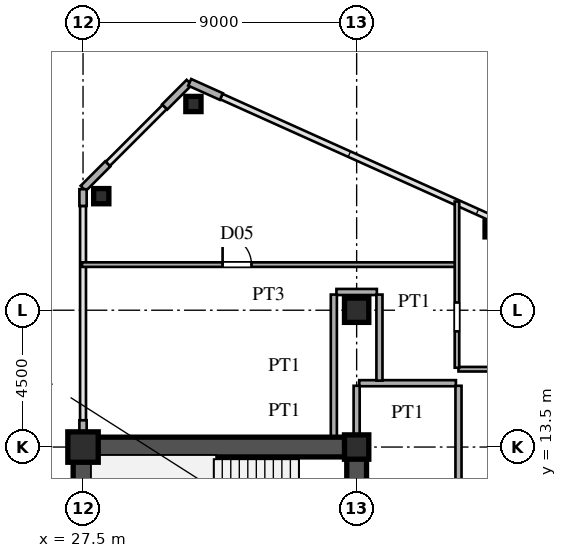
"""IFC4 building model, lengths in metres.
Left out: names, types, materials, properties, quantities, classifications, styles, units other than length and angle.
Written with IfcOpenShell. Run it as: python <this file> out.ifc"""

import sys

from ifc_helpers import new_model, si_unit, direction, frame, frame_2d, origin, origin_2d, place, context, subcontext, project, spatial, rectangle, hollow_rectangle, i_section, extrude, source, transform, mapped, element, fill, save


model = new_model("IFC4")
c1 = context("Model", 3, precision=1e-05, world=origin(), true_north=direction((0.0, 1.0)))
c2 = subcontext(c1, "Body", "Model", "MODEL_VIEW")
j1 = project(units=[si_unit("LENGTHUNIT", "METRE"), si_unit("PLANEANGLEUNIT", "RADIAN")], contexts=[c1])
p1 = place(None, origin())
s1 = spatial("IfcSite", under=j1, at=p1, CompositionType="ELEMENT")
p2 = place(p1, origin())
s2 = spatial("IfcBuilding", under=s1, at=p2, CompositionType="ELEMENT")
p3 = place(p2, frame((0.0, 0.0, 106.8)))
s3 = spatial("IfcBuildingStorey", under=s2, at=p3, CompositionType="ELEMENT", Elevation=106.8)
m1 = source(origin(), c2, "Body", "SweptSolid", [
    extrude(hollow_rectangle(XDim=1.0, YDim=1.0, WallThickness=0.042, at=origin_2d()), origin(), (0.0, 0.0, 1.0), 3.6),
])
p4 = place(p3, frame((27.5, 13.5, 0.0), z_axis=(0.0, 0.0, 1.0), x_axis=(1.0, 0.0, 0.0)))
e1 = element("IfcColumn", 1, at=p4, inside=s3, PredefinedType="COLUMN", context=c2, shape_type="MappedRepresentation", body=[
    mapped(m1, transform((0.0, 0.0, 0.0), scale=1.0)),
])
m2 = source(origin(), c2, "Body", "SweptSolid", [
    extrude(i_section(OverallWidth=0.8, OverallDepth=0.8, WebThickness=0.032, FlangeThickness=0.05, at=origin_2d()), origin(), (0.0, 0.0, 1.0), 3.6),
])
for number, where, z_axis, x_axis in (
    (2, (36.5, 13.5, 0.0), (0.0, 0.0, 1.0), (1.0, 0.0, 0.0)),
    (3, (36.5, 18.0, 0.0), (0.0, 0.0, 1.0), (1.0, 0.0, 0.0)),
):
    element("IfcColumn", number, at=place(p3, frame(where, z_axis=z_axis, x_axis=x_axis)), inside=s3, PredefinedType="COLUMN", context=c2, shape_type="MappedRepresentation", body=[
        mapped(m2, transform((0.0, 0.0, 0.0), scale=1.0)),
    ])
m3 = source(origin(), c2, "Body", "SweptSolid", [
    extrude(hollow_rectangle(XDim=0.5, YDim=0.5, WallThickness=0.02, at=origin_2d()), origin(), (0.0, 0.0, 1.0), 3.6),
])
for number, where, z_axis, x_axis in (
    (4, (31.131, 24.783, 0.0), (0.0, 0.0, 1.0), (1.0, 0.0, 0.0)),
    (5, (28.1, 21.751, 0.0), (0.0, 0.0, 1.0), (1.0, 0.0, 0.0)),
    (6, (40.973, 20.661, 0.0), (0.0, 0.0, 1.0), (1.0, 0.0, 0.0)),
):
    element("IfcColumn", number, at=place(p3, frame(where, z_axis=z_axis, x_axis=x_axis)), inside=s3, PredefinedType="COLUMN", context=c2, shape_type="MappedRepresentation", body=[
        mapped(m3, transform((0.0, 0.0, 0.0), scale=1.0)),
    ])
p5 = place(p3, frame((32.049, 25.028, 0.0), z_axis=(0.0, 0.0, 1.0), x_axis=(-0.911929519623, 0.410346866979, 0.0)))
e7 = element("IfcWall", 7, at=p5, inside=s3, PredefinedType="SOLIDWALL", context=c2, shape_type="SweptSolid", body=[
    extrude(rectangle(XDim=1.14, YDim=0.24, at=frame_2d((0.57, 0.0))), origin(), (0.0, 0.0, 1.0), 3.38),
])
for number, where, z_axis, x_axis in (
    (8, (30.993, 25.493, 0.0), (0.0, 0.0, 1.0), (-0.707, -0.707, 0.0)),
    (9, (28.313, 22.813, 0.0), (0.0, 0.0, 1.0), (-0.707, -0.707, 0.0)),
):
    element("IfcWall", number, at=place(p3, frame(where, z_axis=z_axis, x_axis=x_axis)), inside=s3, PredefinedType="SOLIDWALL", context=c2, shape_type="SweptSolid", body=[
        extrude(rectangle(XDim=1.14, YDim=0.24, at=frame_2d((0.57, 0.0))), origin(), (0.0, 0.0, 1.0), 3.38),
    ])
p6 = place(p3, frame((27.5, 13.83, 0.0), z_axis=(0.0, 0.0, 1.0), x_axis=(0.0, 1.0, 0.0)))
e10 = element("IfcWall", 10, at=p6, inside=s3, PredefinedType="SOLIDWALL", context=c2, shape_type="SweptSolid", body=[
    extrude(rectangle(XDim=0.55, YDim=0.24, at=frame_2d((0.275, 0.0))), origin(), (0.0, 0.0, 1.0), 1.88),
])
p7 = place(p3, frame((27.5, 21.43, 0.0), z_axis=(0.0, 0.0, 1.0), x_axis=(0.0, 1.0, 0.0)))
e11 = element("IfcWall", 11, at=p7, inside=s3, PredefinedType="SOLIDWALL", context=c2, shape_type="SweptSolid", body=[
    extrude(rectangle(XDim=0.55, YDim=0.24, at=frame_2d((0.275, 0.0))), origin(), (0.0, 0.0, 1.0), 3.38),
])
p8 = place(p3, frame((27.5, 1.3, 0.0), z_axis=(0.0, 0.0, 1.0), x_axis=(0.0, 1.0, 0.0)))
e12 = element("IfcWall", 12, at=p8, inside=s3, PredefinedType="SHEAR", context=c2, shape_type="SweptSolid", body=[
    extrude(rectangle(XDim=12.2, YDim=0.65, at=frame_2d((6.1, 0.0))), origin(), (0.0, 0.0, 1.0), 3.38),
])
p9 = place(p3, frame((27.5, 13.5, 0.0), z_axis=(0.0, 0.0, 1.0), x_axis=(1.0, 0.0, 0.0)))
e13 = element("IfcWall", 13, at=p9, inside=s3, PredefinedType="SHEAR", context=c2, shape_type="SweptSolid", body=[
    extrude(rectangle(XDim=9.0, YDim=0.65, at=frame_2d((4.5, 0.0))), origin(), (0.0, 0.0, 1.0), 3.38),
])
p10 = place(p3, frame((36.5, 8.2, 0.0), z_axis=(0.0, 0.0, 1.0), x_axis=(0.0, 1.0, 0.0)))
e14 = element("IfcWall", 14, at=p10, inside=s3, PredefinedType="SHEAR", context=c2, shape_type="SweptSolid", body=[
    extrude(rectangle(XDim=5.45, YDim=0.65, at=frame_2d((2.725, 0.0))), origin(), (0.0, 0.0, 1.0), 3.38),
])
p11 = place(p10, frame((0.245, 0.0, 0.0)))
e15 = element("IfcOpeningElement", 15, at=p11, cuts=e14, PredefinedType="OPENING", context=c2, shape_type="SweptSolid", body=[
    extrude(rectangle(XDim=0.95, YDim=2.15, at=frame_2d((0.475, 1.075))), frame((0.0, 0.335, 0.0), z_axis=(0.0, -1.0, 0.0), x_axis=(1.0, 0.0, 0.0)), (0.0, 0.0, 1.0), 0.67),
])
p12 = place(p3, frame((36.585, 15.6, 0.0), z_axis=(0.0, 0.0, 1.0), x_axis=(1.0, 0.0, 0.0)))
e16 = element("IfcWall", 16, at=p12, inside=s3, PredefinedType="PARTITIONING", context=c2, shape_type="SweptSolid", body=[
    extrude(rectangle(XDim=3.18, YDim=0.2, at=frame_2d((1.59, 0.0))), origin(), (0.0, 0.0, 1.0), 3.38),
])
p13 = place(p3, frame((39.85, 16.06, 0.0), z_axis=(0.0, 0.0, 1.0), x_axis=(1.0, 0.0, 0.0)))
e17 = element("IfcWall", 17, at=p13, inside=s3, PredefinedType="PARTITIONING", context=c2, shape_type="SweptSolid", body=[
    extrude(rectangle(XDim=5.6, YDim=0.15, at=frame_2d((2.8, 0.0))), origin(), (0.0, 0.0, 1.0), 3.38),
])
p14 = place(p13, frame((2.325, 0.0, 0.0)))
e18 = element("IfcOpeningElement", 18, at=p14, cuts=e17, PredefinedType="OPENING", context=c2, shape_type="SweptSolid", body=[
    extrude(rectangle(XDim=0.95, YDim=2.15, at=frame_2d((0.475, 1.075))), frame((0.0, 0.085, 0.0), z_axis=(0.0, -1.0, 0.0), x_axis=(1.0, 0.0, 0.0)), (0.0, 0.0, 1.0), 0.17),
])
p15 = place(p3, frame((35.835, 18.6, 0.0), z_axis=(0.0, 0.0, 1.0), x_axis=(1.0, 0.0, 0.0)))
e19 = element("IfcWall", 19, at=p15, inside=s3, PredefinedType="PARTITIONING", context=c2, shape_type="SweptSolid", body=[
    extrude(rectangle(XDim=1.33, YDim=0.2, at=frame_2d((0.665, 0.0))), origin(), (0.0, 0.0, 1.0), 3.38),
])
p16 = place(p3, frame((27.465, 19.5, 0.0), z_axis=(0.0, 0.0, 1.0), x_axis=(1.0, 0.0, 0.0)))
e20 = element("IfcWall", 20, at=p16, inside=s3, PredefinedType="PARTITIONING", context=c2, shape_type="SweptSolid", body=[
    extrude(rectangle(XDim=12.285, YDim=0.15, at=frame_2d((6.143, 0.0))), origin(), (0.0, 0.0, 1.0), 3.38),
])
p17 = place(p16, frame((4.625, 0.0, 0.0)))
e21 = element("IfcOpeningElement", 21, at=p17, cuts=e20, PredefinedType="OPENING", context=c2, shape_type="SweptSolid", body=[
    extrude(rectangle(XDim=0.95, YDim=2.15, at=frame_2d((0.475, 1.075))), frame((0.0, 0.085, 0.0), z_axis=(0.0, -1.0, 0.0), x_axis=(1.0, 0.0, 0.0)), (0.0, 0.0, 1.0), 0.17),
])
p18 = place(p3, frame((35.75, 13.83, 0.0), z_axis=(0.0, 0.0, 1.0), x_axis=(0.0, 1.0, 0.0)))
e22 = element("IfcWall", 22, at=p18, inside=s3, PredefinedType="PARTITIONING", context=c2, shape_type="SweptSolid", body=[
    extrude(rectangle(XDim=4.685, YDim=0.2, at=frame_2d((2.342, 0.0))), origin(), (0.0, 0.0, 1.0), 3.38),
])
p19 = place(p3, frame((36.5, 13.83, 0.0), z_axis=(0.0, 0.0, 1.0), x_axis=(0.0, 1.0, 0.0)))
e23 = element("IfcWall", 23, at=p19, inside=s3, PredefinedType="PARTITIONING", context=c2, shape_type="SweptSolid", body=[
    extrude(rectangle(XDim=1.685, YDim=0.2, at=frame_2d((0.842, 0.0))), origin(), (0.0, 0.0, 1.0), 1.38),
])
p20 = place(p3, frame((37.25, 15.685, 0.0), z_axis=(0.0, 0.0, 1.0), x_axis=(0.0, 1.0, 0.0)))
e24 = element("IfcWall", 24, at=p20, inside=s3, PredefinedType="PARTITIONING", context=c2, shape_type="SweptSolid", body=[
    extrude(rectangle(XDim=2.83, YDim=0.2, at=frame_2d((1.415, 0.0))), origin(), (0.0, 0.0, 1.0), 3.38),
])
p21 = place(p3, frame((39.8, 16.109, 0.0), z_axis=(0.0, 0.0, 1.0), x_axis=(0.0, 1.0, 0.0)))
e25 = element("IfcWall", 25, at=p21, inside=s3, PredefinedType="PARTITIONING", context=c2, shape_type="SweptSolid", body=[
    extrude(rectangle(XDim=5.466, YDim=0.15, at=frame_2d((2.733, 0.0))), origin(), (0.0, 0.0, 1.0), 3.38),
])
p22 = place(p21, frame((1.195, 0.0, 0.0)))
e26 = element("IfcOpeningElement", 26, at=p22, cuts=e25, PredefinedType="OPENING", context=c2, shape_type="SweptSolid", body=[
    extrude(rectangle(XDim=0.95, YDim=2.15, at=frame_2d((0.475, 1.075))), frame((0.0, 0.085, 0.0), z_axis=(0.0, -1.0, 0.0), x_axis=(1.0, 0.0, 0.0)), (0.0, 0.0, 1.0), 0.17),
])
p23 = place(p3, frame((39.85, -15.515, 0.0), z_axis=(0.0, 0.0, 1.0), x_axis=(0.0, 1.0, 0.0)))
e27 = element("IfcWall", 27, at=p23, inside=s3, PredefinedType="PARTITIONING", context=c2, shape_type="SweptSolid", body=[
    extrude(rectangle(XDim=31.03, YDim=0.2, at=frame_2d((15.515, 0.0))), origin(), (0.0, 0.0, 1.0), 3.38),
])
p24 = place(p23, frame((1.69, 0.0, 0.0)))
e28 = element("IfcOpeningElement", 28, at=p24, cuts=e27, PredefinedType="OPENING", context=c2, shape_type="SweptSolid", body=[
    extrude(rectangle(XDim=1.05, YDim=2.25, at=frame_2d((0.525, 1.125))), frame((0.0, 0.11, 0.0), z_axis=(0.0, -1.0, 0.0), x_axis=(1.0, 0.0, 0.0)), (0.0, 0.0, 1.0), 0.22),
])
p25 = place(p23, frame((10.538, 0.0, 0.0)))
e29 = element("IfcOpeningElement", 29, at=p25, cuts=e27, PredefinedType="OPENING", context=c2, shape_type="SweptSolid", body=[
    extrude(rectangle(XDim=1.05, YDim=2.25, at=frame_2d((0.525, 1.125))), frame((0.0, 0.11, 0.0), z_axis=(0.0, -1.0, 0.0), x_axis=(1.0, 0.0, 0.0)), (0.0, 0.0, 1.0), 0.22),
])
p26 = place(p23, frame((24.067, 0.0, 0.0)))
e30 = element("IfcOpeningElement", 30, at=p26, cuts=e27, PredefinedType="OPENING", context=c2, shape_type="SweptSolid", body=[
    extrude(rectangle(XDim=1.05, YDim=2.25, at=frame_2d((0.525, 1.125))), frame((0.0, 0.11, 0.0), z_axis=(0.0, -1.0, 0.0), x_axis=(1.0, 0.0, 0.0)), (0.0, 0.0, 1.0), 0.22),
])
m4 = source(origin(), c2, "Body", "SweptSolid", [
    extrude(rectangle(XDim=0.95, YDim=2.15, at=frame_2d((0.475, 1.075))), frame((0.0, 0.025, 0.0), z_axis=(0.0, -1.0, 0.0), x_axis=(1.0, 0.0, 0.0)), (0.0, 0.0, 1.0), 0.05),
])
p27 = place(p17, origin())
e31 = element("IfcDoor", 31, at=p27, inside=s3, OperationType="SINGLE_SWING_LEFT", PredefinedType="DOOR", context=c2, shape_type="MappedRepresentation", body=[
    mapped(m4, transform((0.0, 0.0, 0.0), scale=1.0)),
])
fill(e21, e31)
save(model, sys.argv[1])
